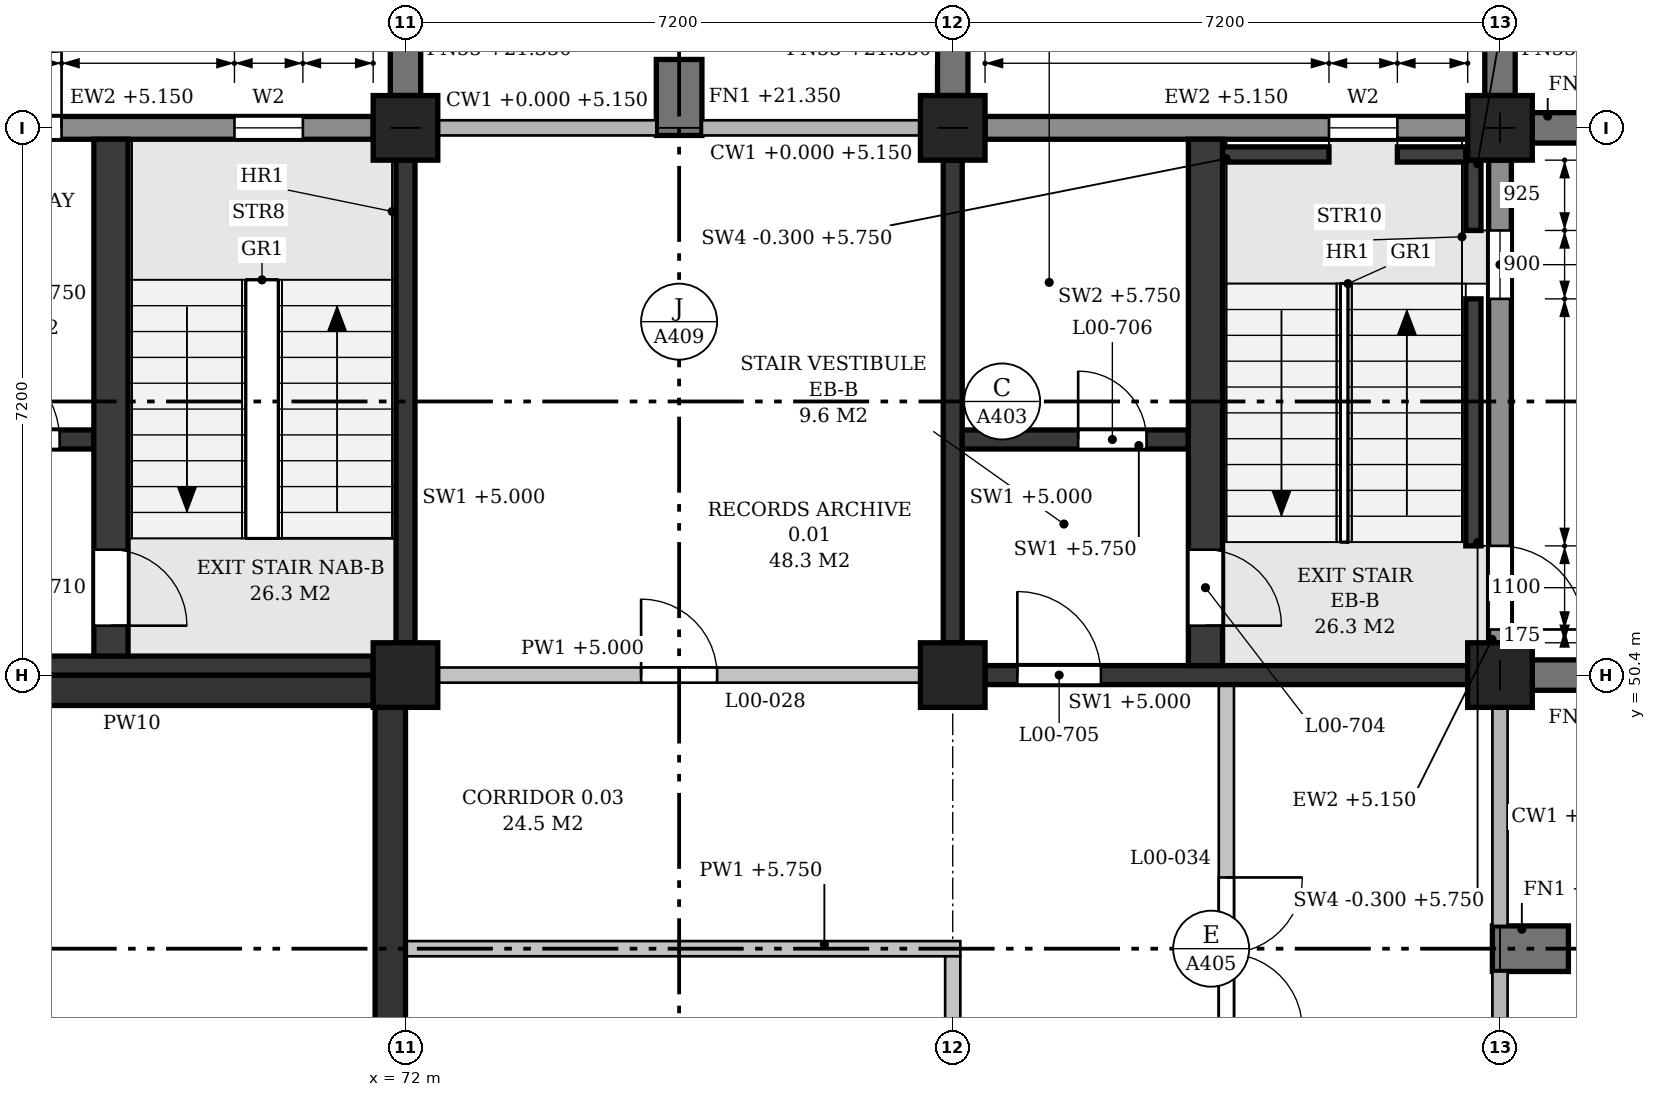
"""IFC4 building model, lengths in metres.
Left out: names, types, materials, properties, quantities, classifications, styles, units other than length and angle.
Written with IfcOpenShell. Run it as: python <this file> out.ifc"""

import sys

from ifc_helpers import new_model, si_unit, direction, frame, frame_2d, origin, origin_2d, place, context, subcontext, project, spatial, polyline, rectangle, outline, extrude, element, fill, save


model = new_model("IFC4")
c1 = context("Model", 3, precision=1e-05, world=origin(), true_north=direction((0.0, 1.0)))
c2 = subcontext(c1, "Body", "Model", "MODEL_VIEW")
j1 = project(units=[si_unit("LENGTHUNIT", "METRE"), si_unit("PLANEANGLEUNIT", "RADIAN")], contexts=[c1])
p1 = place(None, origin())
s1 = spatial("IfcSite", under=j1, at=p1, CompositionType="ELEMENT")
p2 = place(p1, origin())
s2 = spatial("IfcBuilding", under=s1, at=p2, CompositionType="ELEMENT")
p3 = place(p2, origin())
s3 = spatial("IfcBuildingStorey", under=s2, at=p3, CompositionType="ELEMENT", Elevation=0.0)
for number, where, z_axis, x_axis in (
    (1, (72.0, 50.4, 0.0), (0.0, 0.0, 1.0), (1.0, 0.0, 0.0)),
    (2, (72.0, 57.6, 0.0), (0.0, 0.0, 1.0), (1.0, 0.0, 0.0)),
    (3, (79.2, 50.4, 0.0), (0.0, 0.0, 1.0), (1.0, 0.0, 0.0)),
    (4, (79.2, 57.6, 0.0), (0.0, 0.0, 1.0), (1.0, 0.0, 0.0)),
    (5, (86.4, 50.4, 0.0), (0.0, 0.0, 1.0), (1.0, 0.0, 0.0)),
    (6, (86.4, 57.6, 0.0), (0.0, 0.0, 1.0), (1.0, 0.0, 0.0)),
):
    element("IfcColumn", number, at=place(p3, frame(where, z_axis=z_axis, x_axis=x_axis)), inside=s3, PredefinedType="COLUMN", context=c2, shape_type="SweptSolid", body=[
        extrude(rectangle(XDim=0.85, YDim=0.85, at=origin_2d()), origin(), (0.0, 0.0, 1.0), 6.0),
    ])
p4 = place(p3, frame((86.4, 50.825, 0.0), z_axis=(0.0, 0.0, 1.0), x_axis=(0.0, 1.0, 0.0)))
e7 = element("IfcWall", 7, at=p4, inside=s3, PredefinedType="STANDARD", context=c2, shape_type="SweptSolid", body=[
    extrude(rectangle(XDim=6.35, YDim=0.3, at=frame_2d((3.175, 0.0))), origin(), (0.0, 0.0, 1.0), 5.15),
])
p5 = place(p4, frame((0.175, 0.0, 0.0)))
e8 = element("IfcOpeningElement", 8, at=p5, cuts=e7, PredefinedType="OPENING", context=c2, shape_type="SweptSolid", body=[
    extrude(rectangle(XDim=1.1, YDim=2.1, at=frame_2d((0.55, 1.05))), frame((0.0, 0.16, 0.0), z_axis=(0.0, -1.0, 0.0), x_axis=(1.0, 0.0, 0.0)), (0.0, 0.0, 1.0), 0.32),
])
p6 = place(p4, frame((4.525, 0.0, 0.9)))
e9 = element("IfcOpeningElement", 9, at=p6, cuts=e7, PredefinedType="OPENING", context=c2, shape_type="SweptSolid", body=[
    extrude(outline(polyline([(0.0, 0.0), (0.9, 0.0), (0.9, 3.55), (0.45, 4.0), (0.0, 3.55), (0.0, 0.0)])), frame((0.0, 0.16, 0.0), z_axis=(0.0, -1.0, 0.0), x_axis=(1.0, 0.0, 0.0)), (0.0, 0.0, 1.0), 0.32),
])
p7 = place(p3, frame((85.975, 57.6, 0.0), z_axis=(0.0, 0.0, 1.0), x_axis=(-1.0, 0.0, 0.0)))
e10 = element("IfcWall", 10, at=p7, inside=s3, PredefinedType="STANDARD", context=c2, shape_type="SweptSolid", body=[
    extrude(rectangle(XDim=6.35, YDim=0.3, at=frame_2d((3.175, 0.0))), origin(), (0.0, 0.0, 1.0), 5.15),
])
p8 = place(p7, frame((0.925, 0.0, 0.9)))
e11 = element("IfcOpeningElement", 11, at=p8, cuts=e10, PredefinedType="OPENING", context=c2, shape_type="SweptSolid", body=[
    extrude(outline(polyline([(0.0, 0.0), (0.9, 0.0), (0.9, 3.55), (0.45, 4.0), (0.0, 3.55), (0.0, 0.0)])), frame((0.0, 0.16, 0.0), z_axis=(0.0, -1.0, 0.0), x_axis=(1.0, 0.0, 0.0)), (0.0, 0.0, 1.0), 0.32),
])
p9 = place(p3, frame((71.575, 57.6, 0.0), z_axis=(0.0, 0.0, 1.0), x_axis=(-1.0, 0.0, 0.0)))
e12 = element("IfcWall", 12, at=p9, inside=s3, PredefinedType="STANDARD", context=c2, shape_type="SweptSolid", body=[
    extrude(rectangle(XDim=6.35, YDim=0.3, at=frame_2d((3.175, 0.0))), origin(), (0.0, 0.0, 1.0), 5.15),
])
p10 = place(p9, frame((4.1, 0.0, 0.0)))
e13 = element("IfcOpeningElement", 13, at=p10, cuts=e12, PredefinedType="OPENING", context=c2, shape_type="SweptSolid", body=[
    extrude(rectangle(XDim=2.0, YDim=2.1, at=frame_2d((1.0, 1.05))), frame((0.0, 0.16, 0.0), z_axis=(0.0, -1.0, 0.0), x_axis=(1.0, 0.0, 0.0)), (0.0, 0.0, 1.0), 0.32),
])
p11 = place(p9, frame((0.925, 0.0, 0.9)))
e14 = element("IfcOpeningElement", 14, at=p11, cuts=e12, PredefinedType="OPENING", context=c2, shape_type="SweptSolid", body=[
    extrude(outline(polyline([(0.0, 0.0), (0.9, 0.0), (0.9, 3.55), (0.45, 4.0), (0.0, 3.55), (0.0, 0.0)])), frame((0.0, 0.16, 0.0), z_axis=(0.0, -1.0, 0.0), x_axis=(1.0, 0.0, 0.0)), (0.0, 0.0, 1.0), 0.32),
])
for number, where, z_axis, x_axis in (
    (15, (86.3, 46.8, 0.0), (0.0, 0.0, 1.0), (1.0, 0.0, 0.0)),
    (16, (75.6, 57.5, 0.0), (0.0, 0.0, 1.0), (0.0, 1.0, 0.0)),
):
    element("IfcWall", number, at=place(p3, frame(where, z_axis=z_axis, x_axis=x_axis)), inside=s3, PredefinedType="POLYGONAL", context=c2, shape_type="SweptSolid", body=[
        extrude(outline(polyline([(1.0, 0.0), (1.0, 20.975), (0.75, 21.35), (0.35, 21.35), (0.35, 20.75), (0.0, 20.75), (0.0, 16.8), (0.35, 16.8), (0.35, 15.95), (0.0, 15.95), (0.0, 11.4), (0.35, 11.4), (0.35, 10.55), (0.0, 10.55), (0.0, 6.0), (0.35, 6.0), (0.35, 5.15), (0.0, 5.15), (0.0, 0.0), (1.0, 0.0)])), frame((0.0, 0.3, 0.0), z_axis=(0.0, -1.0, 0.0), x_axis=(1.0, 0.0, 0.0)), (0.0, 0.0, 1.0), 0.6),
    ])
for number, where, z_axis, x_axis in (
    (17, (72.0, 58.025, 0.0), (0.0, 0.0, 1.0), (0.0, 1.0, 0.0)),
    (18, (79.2, 58.025, 0.0), (0.0, 0.0, 1.0), (0.0, 1.0, 0.0)),
    (19, (86.825, 50.4, 0.0), (0.0, 0.0, 1.0), (1.0, 0.0, 0.0)),
    (20, (86.4, 58.025, 0.0), (0.0, 0.0, 1.0), (0.0, 1.0, 0.0)),
    (21, (86.825, 57.6, 0.0), (0.0, 0.0, 1.0), (1.0, 0.0, 0.0)),
):
    element("IfcWall", number, at=place(p3, frame(where, z_axis=z_axis, x_axis=x_axis)), inside=s3, PredefinedType="POLYGONAL", context=c2, shape_type="SweptSolid", body=[
        extrude(outline(polyline([(1.2, 0.0), (1.2, 20.825), (0.85, 21.35), (0.0, 21.35), (0.0, 0.0), (1.2, 0.0)])), frame((0.0, 0.2, 0.0), z_axis=(0.0, -1.0, 0.0), x_axis=(1.0, 0.0, 0.0)), (0.0, 0.0, 1.0), 0.4),
    ])
p12 = place(p3, frame((79.625, 50.4, 0.0), z_axis=(0.0, 0.0, 1.0), x_axis=(1.0, 0.0, 0.0)))
e22 = element("IfcWall", 22, at=p12, inside=s3, PredefinedType="SHEAR", context=c2, shape_type="SweptSolid", body=[
    extrude(rectangle(XDim=6.35, YDim=0.25, at=frame_2d((3.175, 0.0))), origin(), (0.0, 0.0, 1.0), 5.0),
])
p13 = place(p12, frame((0.425, 0.0, 0.0)))
e23 = element("IfcOpeningElement", 23, at=p13, cuts=e22, PredefinedType="OPENING", context=c2, shape_type="SweptSolid", body=[
    extrude(rectangle(XDim=1.1, YDim=2.1, at=frame_2d((0.55, 1.05))), frame((0.0, 0.135, 0.0), z_axis=(0.0, -1.0, 0.0), x_axis=(1.0, 0.0, 0.0)), (0.0, 0.0, 1.0), 0.27),
])
p14 = place(p3, frame((79.2, 50.825, 0.0), z_axis=(0.0, 0.0, 1.0), x_axis=(0.0, 1.0, 0.0)))
e24 = element("IfcWall", 24, at=p14, inside=s3, PredefinedType="SHEAR", context=c2, shape_type="SweptSolid", body=[
    extrude(rectangle(XDim=6.35, YDim=0.25, at=frame_2d((3.175, 0.0))), origin(), (0.0, 0.0, 1.0), 5.0),
])
p15 = place(p3, frame((86.05, 52.1, -0.3), z_axis=(0.0, 0.0, 1.0), x_axis=(0.0, 1.0, 0.0)))
e25 = element("IfcWall", 25, at=p15, inside=s3, PredefinedType="SHEAR", context=c2, shape_type="SweptSolid", body=[
    extrude(rectangle(XDim=3.25, YDim=0.2, at=frame_2d((1.625, 0.0))), origin(), (0.0, 0.0, 1.0), 6.05),
])
p16 = place(p3, frame((86.05, 56.25, -0.3), z_axis=(0.0, 0.0, 1.0), x_axis=(0.0, 1.0, 0.0)))
e26 = element("IfcWall", 26, at=p16, inside=s3, PredefinedType="SHEAR", context=c2, shape_type="SweptSolid", body=[
    extrude(rectangle(XDim=0.925, YDim=0.2, at=frame_2d((0.462, 0.0))), origin(), (0.0, 0.0, 1.0), 6.05),
])
p17 = place(p3, frame((82.75, 57.25, -0.3), z_axis=(0.0, 0.0, 1.0), x_axis=(1.0, 0.0, 0.0)))
e27 = element("IfcWall", 27, at=p17, inside=s3, PredefinedType="SHEAR", context=c2, shape_type="SweptSolid", body=[
    extrude(rectangle(XDim=1.4, YDim=0.2, at=frame_2d((0.7, 0.0))), origin(), (0.0, 0.0, 1.0), 6.05),
])
p18 = place(p3, frame((85.05, 57.25, -0.3), z_axis=(0.0, 0.0, 1.0), x_axis=(1.0, 0.0, 0.0)))
e28 = element("IfcWall", 28, at=p18, inside=s3, PredefinedType="SHEAR", context=c2, shape_type="SweptSolid", body=[
    extrude(rectangle(XDim=0.9, YDim=0.2, at=frame_2d((0.45, 0.0))), origin(), (0.0, 0.0, 1.0), 6.05),
])
p19 = place(p3, frame((82.525, 50.525, 0.0), z_axis=(0.0, 0.0, 1.0), x_axis=(0.0, 1.0, 0.0)))
e29 = element("IfcWall", 29, at=p19, inside=s3, PredefinedType="SHEAR", context=c2, shape_type="SweptSolid", body=[
    extrude(rectangle(XDim=6.925, YDim=0.45, at=frame_2d((3.462, 0.0))), origin(), (0.0, 0.0, 1.0), 5.75),
])
p20 = place(p19, frame((0.525, 0.0, 0.0)))
e30 = element("IfcOpeningElement", 30, at=p20, cuts=e29, PredefinedType="OPENING", context=c2, shape_type="SweptSolid", body=[
    extrude(rectangle(XDim=1.0, YDim=2.1, at=frame_2d((0.5, 1.05))), frame((0.0, 0.235, 0.0), z_axis=(0.0, -1.0, 0.0), x_axis=(1.0, 0.0, 0.0)), (0.0, 0.0, 1.0), 0.47),
])
p21 = place(p3, frame((79.325, 53.5, 0.0), z_axis=(0.0, 0.0, 1.0), x_axis=(1.0, 0.0, 0.0)))
e31 = element("IfcWall", 31, at=p21, inside=s3, PredefinedType="SHEAR", context=c2, shape_type="SweptSolid", body=[
    extrude(rectangle(XDim=2.975, YDim=0.25, at=frame_2d((1.488, 0.0))), origin(), (0.0, 0.0, 1.0), 5.75),
])
p22 = place(p21, frame((1.525, 0.0, 0.0)))
e32 = element("IfcOpeningElement", 32, at=p22, cuts=e31, PredefinedType="OPENING", context=c2, shape_type="SweptSolid", body=[
    extrude(rectangle(XDim=0.9, YDim=2.1, at=frame_2d((0.45, 1.05))), frame((0.0, 0.135, 0.0), z_axis=(0.0, -1.0, 0.0), x_axis=(1.0, 0.0, 0.0)), (0.0, 0.0, 1.0), 0.27),
])
p23 = place(p3, frame((65.225, 50.525, 0.0), z_axis=(0.0, 0.0, 1.0), x_axis=(1.0, 0.0, 0.0)))
e33 = element("IfcWall", 33, at=p23, inside=s3, PredefinedType="SHEAR", context=c2, shape_type="SweptSolid", body=[
    extrude(rectangle(XDim=6.35, YDim=0.25, at=frame_2d((3.175, 0.0))), origin(), (0.0, 0.0, 1.0), 5.05),
])
p24 = place(p3, frame((72.0, 50.825, 0.0), z_axis=(0.0, 0.0, 1.0), x_axis=(0.0, 1.0, 0.0)))
e34 = element("IfcWall", 34, at=p24, inside=s3, PredefinedType="SHEAR", context=c2, shape_type="SweptSolid", body=[
    extrude(rectangle(XDim=6.35, YDim=0.25, at=frame_2d((3.175, 0.0))), origin(), (0.0, 0.0, 1.0), 5.0),
])
p25 = place(p3, frame((68.125, 50.65, 0.0), z_axis=(0.0, 0.0, 1.0), x_axis=(0.0, 1.0, 0.0)))
e35 = element("IfcWall", 35, at=p25, inside=s3, PredefinedType="SHEAR", context=c2, shape_type="SweptSolid", body=[
    extrude(rectangle(XDim=6.8, YDim=0.45, at=frame_2d((3.4, 0.0))), origin(), (0.0, 0.0, 1.0), 5.75),
])
p26 = place(p25, frame((0.4, 0.0, 0.0)))
e36 = element("IfcOpeningElement", 36, at=p26, cuts=e35, PredefinedType="OPENING", context=c2, shape_type="SweptSolid", body=[
    extrude(rectangle(XDim=1.0, YDim=2.1, at=frame_2d((0.5, 1.05))), frame((0.0, 0.235, 0.0), z_axis=(0.0, -1.0, 0.0), x_axis=(1.0, 0.0, 0.0)), (0.0, 0.0, 1.0), 0.47),
])
p27 = place(p3, frame((64.925, 53.5, 0.0), z_axis=(0.0, 0.0, 1.0), x_axis=(1.0, 0.0, 0.0)))
e37 = element("IfcWall", 37, at=p27, inside=s3, PredefinedType="SHEAR", context=c2, shape_type="SweptSolid", body=[
    extrude(rectangle(XDim=2.975, YDim=0.25, at=frame_2d((1.487, 0.0))), origin(), (0.0, 0.0, 1.0), 5.75),
])
p28 = place(p27, frame((1.425, 0.0, 0.0)))
e38 = element("IfcOpeningElement", 38, at=p28, cuts=e37, PredefinedType="OPENING", context=c2, shape_type="SweptSolid", body=[
    extrude(rectangle(XDim=1.1, YDim=2.1, at=frame_2d((0.55, 1.05))), frame((0.0, 0.135, 0.0), z_axis=(0.0, -1.0, 0.0), x_axis=(1.0, 0.0, 0.0)), (0.0, 0.0, 1.0), 0.27),
])
p29 = place(p3, frame((72.0, 46.8, 0.0), z_axis=(0.0, 0.0, 1.0), x_axis=(1.0, 0.0, 0.0)))
e39 = element("IfcWall", 39, at=p29, inside=s3, PredefinedType="PARTITIONING", context=c2, shape_type="SweptSolid", body=[
    extrude(outline(polyline([(0.0, 0.0), (7.3, 0.0), (7.3, 5.0), (6.95, 5.0), (6.95, 5.75), (0.55, 5.75), (0.55, 5.05), (0.0, 5.05), (0.0, 0.0)])), frame((0.0, 0.1, 0.0), z_axis=(0.0, -1.0, 0.0), x_axis=(1.0, 0.0, 0.0)), (0.0, 0.0, 1.0), 0.2),
])
p30 = place(p3, frame((65.225, 50.2, 0.0), z_axis=(0.0, 0.0, 1.0), x_axis=(1.0, 0.0, 0.0)))
e40 = element("IfcWall", 40, at=p30, inside=s3, PredefinedType="SOLIDWALL", context=c2, shape_type="SweptSolid", body=[
    extrude(rectangle(XDim=6.35, YDim=0.4, at=frame_2d((3.175, 0.0))), origin(), (0.0, 0.0, 1.0), 10.7),
])
p31 = place(p3, frame((72.425, 50.4, 0.0), z_axis=(0.0, 0.0, 1.0), x_axis=(1.0, 0.0, 0.0)))
e41 = element("IfcWall", 41, at=p31, inside=s3, PredefinedType="PARTITIONING", context=c2, shape_type="SweptSolid", body=[
    extrude(rectangle(XDim=6.35, YDim=0.2, at=frame_2d((3.175, 0.0))), origin(), (0.0, 0.0, 1.0), 5.0),
])
p32 = place(p31, frame((2.675, 0.0, 0.0)))
e42 = element("IfcOpeningElement", 42, at=p32, cuts=e41, PredefinedType="OPENING", context=c2, shape_type="SweptSolid", body=[
    extrude(rectangle(XDim=1.0, YDim=2.1, at=frame_2d((0.5, 1.05))), frame((0.0, 0.11, 0.0), z_axis=(0.0, -1.0, 0.0), x_axis=(1.0, 0.0, 0.0)), (0.0, 0.0, 1.0), 0.22),
])
p33 = place(p3, frame((71.8, 43.625, 0.0), z_axis=(0.0, 0.0, 1.0), x_axis=(0.0, 1.0, 0.0)))
e43 = element("IfcWall", 43, at=p33, inside=s3, PredefinedType="SOLIDWALL", context=c2, shape_type="SweptSolid", body=[
    extrude(rectangle(XDim=6.35, YDim=0.4, at=frame_2d((3.175, 0.0))), origin(), (0.0, 0.0, 1.0), 10.55),
])
p34 = place(p3, frame((79.2, 43.625, 0.0), z_axis=(0.0, 0.0, 1.0), x_axis=(0.0, 1.0, 0.0)))
e44 = element("IfcWall", 44, at=p34, inside=s3, PredefinedType="PARTITIONING", context=c2, shape_type="SweptSolid", body=[
    extrude(rectangle(XDim=3.075, YDim=0.2, at=frame_2d((1.538, 0.0))), origin(), (0.0, 0.0, 1.0), 5.0),
])
p35 = place(p3, frame((82.8, 43.2, 0.0), z_axis=(0.0, 0.0, 1.0), x_axis=(0.0, 1.0, 0.0)))
e45 = element("IfcWall", 45, at=p35, inside=s3, PredefinedType="PARTITIONING", context=c2, shape_type="SweptSolid", body=[
    extrude(outline(polyline([(0.0, 0.0), (7.075, 0.0), (7.075, 5.0), (6.95, 5.0), (6.95, 5.75), (0.25, 5.75), (0.25, 5.0), (0.0, 5.0), (0.0, 0.0)])), frame((0.0, 0.1, 0.0), z_axis=(0.0, -1.0, 0.0), x_axis=(1.0, 0.0, 0.0)), (0.0, 0.0, 1.0), 0.2),
])
p36 = place(p35, frame((2.537, 0.0, 0.0)))
e46 = element("IfcOpeningElement", 46, at=p36, cuts=e45, PredefinedType="OPENING", context=c2, shape_type="SweptSolid", body=[
    extrude(rectangle(XDim=2.0, YDim=2.1, at=frame_2d((1.0, 1.05))), frame((0.0, 0.11, 0.0), z_axis=(0.0, -1.0, 0.0), x_axis=(1.0, 0.0, 0.0)), (0.0, 0.0, 1.0), 0.22),
])
p37 = place(p5, frame((1.1, 0.0, 0.0), z_axis=(0.0, 0.0, 1.0), x_axis=(-1.0, 0.0, 0.0)))
e47 = element("IfcDoor", 47, at=p37, inside=s3, OperationType="SINGLE_SWING_RIGHT", PredefinedType="DOOR", context=c2, shape_type="SweptSolid", body=[
    extrude(rectangle(XDim=1.1, YDim=2.1, at=frame_2d((0.55, 1.05))), frame((0.0, 0.025, 0.0), z_axis=(0.0, -1.0, 0.0), x_axis=(1.0, 0.0, 0.0)), (0.0, 0.0, 1.0), 0.05),
])
fill(e8, e47)
p38 = place(p10, frame((2.0, 0.0, 0.0), z_axis=(0.0, 0.0, 1.0), x_axis=(-1.0, 0.0, 0.0)))
e48 = element("IfcDoor", 48, at=p38, inside=s3, OperationType="DOUBLE_DOOR_SINGLE_SWING", PredefinedType="DOOR", context=c2, shape_type="SweptSolid", body=[
    extrude(rectangle(XDim=2.0, YDim=2.1, at=frame_2d((1.0, 1.05))), frame((0.0, 0.025, 0.0), z_axis=(0.0, -1.0, 0.0), x_axis=(1.0, 0.0, 0.0)), (0.0, 0.0, 1.0), 0.05),
])
fill(e13, e48)
p39 = place(p6, origin())
e49 = element("IfcWindow", 49, at=p39, inside=s3, PartitioningType="SINGLE_PANEL", PredefinedType="WINDOW", context=c2, shape_type="SweptSolid", body=[
    extrude(outline(polyline([(0.0, 0.0), (0.9, 0.0), (0.9, 3.55), (0.45, 4.0), (0.0, 3.55), (0.0, 0.0)])), frame((0.0, 0.03, 0.0), z_axis=(0.0, -1.0, 0.0), x_axis=(1.0, 0.0, 0.0)), (0.0, 0.0, 1.0), 0.06),
])
fill(e9, e49)
p40 = place(p8, origin())
e50 = element("IfcWindow", 50, at=p40, inside=s3, PartitioningType="SINGLE_PANEL", PredefinedType="WINDOW", context=c2, shape_type="SweptSolid", body=[
    extrude(outline(polyline([(0.0, 0.0), (0.9, 0.0), (0.9, 3.55), (0.45, 4.0), (0.0, 3.55), (0.0, 0.0)])), frame((0.0, 0.03, 0.0), z_axis=(0.0, -1.0, 0.0), x_axis=(1.0, 0.0, 0.0)), (0.0, 0.0, 1.0), 0.06),
])
fill(e11, e50)
p41 = place(p11, origin())
e51 = element("IfcWindow", 51, at=p41, inside=s3, PartitioningType="SINGLE_PANEL", PredefinedType="WINDOW", context=c2, shape_type="SweptSolid", body=[
    extrude(outline(polyline([(0.0, 0.0), (0.9, 0.0), (0.9, 3.55), (0.45, 4.0), (0.0, 3.55), (0.0, 0.0)])), frame((0.0, 0.03, 0.0), z_axis=(0.0, -1.0, 0.0), x_axis=(1.0, 0.0, 0.0)), (0.0, 0.0, 1.0), 0.06),
])
fill(e14, e51)
p42 = place(p20, frame((1.0, 0.0, 0.0), z_axis=(0.0, 0.0, 1.0), x_axis=(-1.0, 0.0, 0.0)))
e52 = element("IfcDoor", 52, at=p42, inside=s3, OperationType="SINGLE_SWING_RIGHT", PredefinedType="DOOR", context=c2, shape_type="SweptSolid", body=[
    extrude(rectangle(XDim=1.0, YDim=2.1, at=frame_2d((0.5, 1.05))), frame((0.0, 0.025, 0.0), z_axis=(0.0, -1.0, 0.0), x_axis=(1.0, 0.0, 0.0)), (0.0, 0.0, 1.0), 0.05),
])
fill(e30, e52)
p43 = place(p13, origin())
e53 = element("IfcDoor", 53, at=p43, inside=s3, OperationType="SINGLE_SWING_LEFT", PredefinedType="DOOR", context=c2, shape_type="SweptSolid", body=[
    extrude(rectangle(XDim=1.1, YDim=2.1, at=frame_2d((0.55, 1.05))), frame((0.0, 0.025, 0.0), z_axis=(0.0, -1.0, 0.0), x_axis=(1.0, 0.0, 0.0)), (0.0, 0.0, 1.0), 0.05),
])
fill(e23, e53)
p44 = place(p22, origin())
e54 = element("IfcDoor", 54, at=p44, inside=s3, OperationType="SINGLE_SWING_LEFT", PredefinedType="DOOR", context=c2, shape_type="SweptSolid", body=[
    extrude(rectangle(XDim=0.9, YDim=2.1, at=frame_2d((0.45, 1.05))), frame((0.0, 0.025, 0.0), z_axis=(0.0, -1.0, 0.0), x_axis=(1.0, 0.0, 0.0)), (0.0, 0.0, 1.0), 0.05),
])
fill(e32, e54)
p45 = place(p26, frame((1.0, 0.0, 0.0), z_axis=(0.0, 0.0, 1.0), x_axis=(-1.0, 0.0, 0.0)))
e55 = element("IfcDoor", 55, at=p45, inside=s3, OperationType="SINGLE_SWING_RIGHT", PredefinedType="DOOR", context=c2, shape_type="SweptSolid", body=[
    extrude(rectangle(XDim=1.0, YDim=2.1, at=frame_2d((0.5, 1.05))), frame((0.0, 0.025, 0.0), z_axis=(0.0, -1.0, 0.0), x_axis=(1.0, 0.0, 0.0)), (0.0, 0.0, 1.0), 0.05),
])
fill(e36, e55)
p46 = place(p28, origin())
e56 = element("IfcDoor", 56, at=p46, inside=s3, OperationType="SINGLE_SWING_LEFT", PredefinedType="DOOR", context=c2, shape_type="SweptSolid", body=[
    extrude(rectangle(XDim=1.1, YDim=2.1, at=frame_2d((0.55, 1.05))), frame((0.0, 0.025, 0.0), z_axis=(0.0, -1.0, 0.0), x_axis=(1.0, 0.0, 0.0)), (0.0, 0.0, 1.0), 0.05),
])
fill(e38, e56)
p47 = place(p32, origin())
e57 = element("IfcDoor", 57, at=p47, inside=s3, OperationType="SINGLE_SWING_LEFT", PredefinedType="DOOR", context=c2, shape_type="SweptSolid", body=[
    extrude(rectangle(XDim=1.0, YDim=2.1, at=frame_2d((0.5, 1.05))), frame((0.0, 0.025, 0.0), z_axis=(0.0, -1.0, 0.0), x_axis=(1.0, 0.0, 0.0)), (0.0, 0.0, 1.0), 0.05),
])
fill(e42, e57)
p48 = place(p36, origin())
e58 = element("IfcDoor", 58, at=p48, inside=s3, OperationType="DOUBLE_DOOR_SINGLE_SWING", PredefinedType="DOOR", context=c2, shape_type="SweptSolid", body=[
    extrude(rectangle(XDim=2.0, YDim=2.1, at=frame_2d((1.0, 1.05))), frame((0.0, 0.025, 0.0), z_axis=(0.0, -1.0, 0.0), x_axis=(1.0, 0.0, 0.0)), (0.0, 0.0, 1.0), 0.05),
])
fill(e46, e58)
save(model, sys.argv[1])
